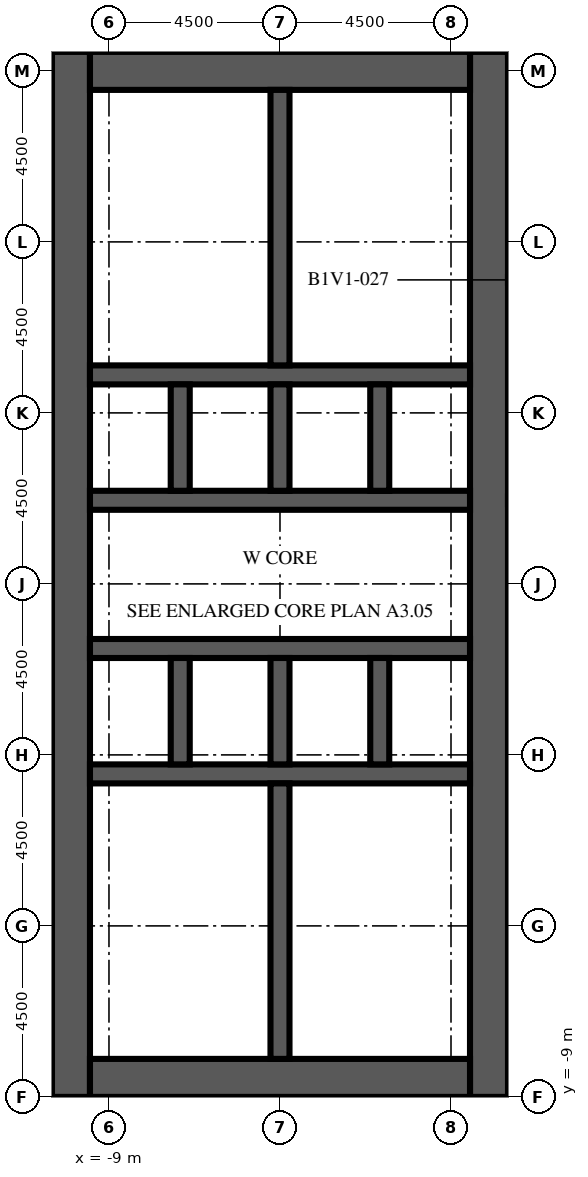
"""IFC4 building model, lengths in metres.
Left out: names, types, materials, properties, quantities, classifications, styles, units other than length and angle.
Written with IfcOpenShell. Run it as: python <this file> out.ifc"""

import sys

from ifc_helpers import new_model, si_unit, direction, frame, frame_2d, origin, place, context, subcontext, project, spatial, rectangle, extrude, element, fill, save


model = new_model("IFC4")
c1 = context("Model", 3, precision=1e-05, world=origin(), true_north=direction((0.0, 1.0)))
c2 = subcontext(c1, "Body", "Model", "MODEL_VIEW")
j1 = project(units=[si_unit("LENGTHUNIT", "METRE"), si_unit("PLANEANGLEUNIT", "RADIAN")], contexts=[c1])
p1 = place(None, origin())
s1 = spatial("IfcSite", under=j1, at=p1, CompositionType="ELEMENT")
p2 = place(p1, origin())
s2 = spatial("IfcBuilding", under=s1, at=p2, CompositionType="ELEMENT")
p3 = place(p2, frame((0.0, 0.0, 19.5)))
s3 = spatial("IfcBuildingStorey", under=s2, at=p3, CompositionType="ELEMENT", Elevation=19.5)
p4 = place(p3, frame((-10.0, -9.0, 0.0), z_axis=(0.0, 0.0, 1.0), x_axis=(0.0, 1.0, 0.0)))
e1 = element("IfcWall", 1, at=p4, inside=s3, PredefinedType="SHEAR", context=c2, shape_type="SweptSolid", body=[
    extrude(rectangle(XDim=27.5, YDim=1.0, at=frame_2d((13.75, 0.0))), origin(), (0.0, 0.0, 1.0), 4.1),
])
p5 = place(p4, frame((12.55, 0.0, 0.0)))
e2 = element("IfcOpeningElement", 2, at=p5, cuts=e1, PredefinedType="OPENING", context=c2, shape_type="SweptSolid", body=[
    extrude(rectangle(XDim=2.4, YDim=2.4, at=frame_2d((1.2, 1.2))), frame((0.0, 0.51, 0.0), z_axis=(0.0, -1.0, 0.0), x_axis=(1.0, 0.0, 0.0)), (0.0, 0.0, 1.0), 1.02),
])
p6 = place(p4, frame((6.825, 0.0, 0.0)))
e3 = element("IfcOpeningElement", 3, at=p6, cuts=e1, PredefinedType="OPENING", context=c2, shape_type="SweptSolid", body=[
    extrude(rectangle(XDim=1.2, YDim=2.1, at=frame_2d((0.6, 1.05))), frame((0.0, 0.51, 0.0), z_axis=(0.0, -1.0, 0.0), x_axis=(1.0, 0.0, 0.0)), (0.0, 0.0, 1.0), 1.02),
])
p7 = place(p4, frame((19.475, 0.0, 0.0)))
e4 = element("IfcOpeningElement", 4, at=p7, cuts=e1, PredefinedType="OPENING", context=c2, shape_type="SweptSolid", body=[
    extrude(rectangle(XDim=1.2, YDim=2.1, at=frame_2d((0.6, 1.05))), frame((0.0, 0.51, 0.0), z_axis=(0.0, -1.0, 0.0), x_axis=(1.0, 0.0, 0.0)), (0.0, 0.0, 1.0), 1.02),
])
p8 = place(p3, frame((1.0, -9.0, 0.0), z_axis=(0.0, 0.0, 1.0), x_axis=(0.0, 1.0, 0.0)))
e5 = element("IfcWall", 5, at=p8, inside=s3, PredefinedType="SHEAR", context=c2, shape_type="SweptSolid", body=[
    extrude(rectangle(XDim=27.5, YDim=1.0, at=frame_2d((13.75, 0.0))), origin(), (0.0, 0.0, 1.0), 4.1),
])
p9 = place(p8, frame((12.55, 0.0, 0.0)))
e6 = element("IfcOpeningElement", 6, at=p9, cuts=e5, PredefinedType="OPENING", context=c2, shape_type="SweptSolid", body=[
    extrude(rectangle(XDim=2.4, YDim=2.4, at=frame_2d((1.2, 1.2))), frame((0.0, 0.51, 0.0), z_axis=(0.0, -1.0, 0.0), x_axis=(1.0, 0.0, 0.0)), (0.0, 0.0, 1.0), 1.02),
])
p10 = place(p8, frame((3.955, 0.0, 0.0)))
e7 = element("IfcOpeningElement", 7, at=p10, cuts=e5, PredefinedType="OPENING", context=c2, shape_type="SweptSolid", body=[
    extrude(rectangle(XDim=0.905, YDim=2.1, at=frame_2d((0.453, 1.05))), frame((0.0, 0.51, 0.0), z_axis=(0.0, -1.0, 0.0), x_axis=(1.0, 0.0, 0.0)), (0.0, 0.0, 1.0), 1.02),
])
p11 = place(p8, frame((23.363, 0.0, 0.0)))
e8 = element("IfcOpeningElement", 8, at=p11, cuts=e5, PredefinedType="OPENING", context=c2, shape_type="SweptSolid", body=[
    extrude(rectangle(XDim=1.2, YDim=2.1, at=frame_2d((0.6, 1.05))), frame((0.0, 0.51, 0.0), z_axis=(0.0, -1.0, 0.0), x_axis=(1.0, 0.0, 0.0)), (0.0, 0.0, 1.0), 1.02),
])
for number, where, z_axis, x_axis in (
    (9, (-9.5, -8.5, 0.0), (0.0, 0.0, 1.0), (1.0, 0.0, 0.0)),
    (10, (-9.5, 18.0, 0.0), (0.0, 0.0, 1.0), (1.0, 0.0, 0.0)),
):
    element("IfcWall", number, at=place(p3, frame(where, z_axis=z_axis, x_axis=x_axis)), inside=s3, PredefinedType="SHEAR", context=c2, shape_type="SweptSolid", body=[
        extrude(rectangle(XDim=10.0, YDim=1.0, at=frame_2d((5.0, 0.0))), origin(), (0.0, 0.0, 1.0), 4.1),
    ])
p12 = place(p3, frame((-9.5, -0.5, 0.0), z_axis=(0.0, 0.0, 1.0), x_axis=(1.0, 0.0, 0.0)))
e11 = element("IfcWall", 11, at=p12, inside=s3, PredefinedType="SHEAR", context=c2, shape_type="SweptSolid", body=[
    extrude(rectangle(XDim=10.0, YDim=0.5, at=frame_2d((5.0, 0.0))), origin(), (0.0, 0.0, 1.0), 4.1),
])
p13 = place(p3, frame((-9.5, 2.8, 0.0), z_axis=(0.0, 0.0, 1.0), x_axis=(1.0, 0.0, 0.0)))
e12 = element("IfcWall", 12, at=p13, inside=s3, PredefinedType="SHEAR", context=c2, shape_type="SweptSolid", body=[
    extrude(rectangle(XDim=10.0, YDim=0.5, at=frame_2d((5.0, 0.0))), origin(), (0.0, 0.0, 1.0), 4.1),
])
p14 = place(p13, frame((0.512, 0.0, 0.0)))
e13 = element("IfcOpeningElement", 13, at=p14, cuts=e12, PredefinedType="OPENING", context=c2, shape_type="SweptSolid", body=[
    extrude(rectangle(XDim=1.1, YDim=2.1, at=frame_2d((0.55, 1.05))), frame((0.0, 0.26, 0.0), z_axis=(0.0, -1.0, 0.0), x_axis=(1.0, 0.0, 0.0)), (0.0, 0.0, 1.0), 0.52),
])
p15 = place(p13, frame((3.137, 0.0, 0.0)))
e14 = element("IfcOpeningElement", 14, at=p15, cuts=e12, PredefinedType="OPENING", context=c2, shape_type="SweptSolid", body=[
    extrude(rectangle(XDim=1.1, YDim=2.1, at=frame_2d((0.55, 1.05))), frame((0.0, 0.26, 0.0), z_axis=(0.0, -1.0, 0.0), x_axis=(1.0, 0.0, 0.0)), (0.0, 0.0, 1.0), 0.52),
])
p16 = place(p13, frame((8.387, 0.0, 0.0)))
e15 = element("IfcOpeningElement", 15, at=p16, cuts=e12, PredefinedType="OPENING", context=c2, shape_type="SweptSolid", body=[
    extrude(rectangle(XDim=1.1, YDim=2.1, at=frame_2d((0.55, 1.05))), frame((0.0, 0.26, 0.0), z_axis=(0.0, -1.0, 0.0), x_axis=(1.0, 0.0, 0.0)), (0.0, 0.0, 1.0), 0.52),
])
p17 = place(p3, frame((-9.5, 6.7, 0.0), z_axis=(0.0, 0.0, 1.0), x_axis=(1.0, 0.0, 0.0)))
e16 = element("IfcWall", 16, at=p17, inside=s3, PredefinedType="SHEAR", context=c2, shape_type="SweptSolid", body=[
    extrude(rectangle(XDim=10.0, YDim=0.5, at=frame_2d((5.0, 0.0))), origin(), (0.0, 0.0, 1.0), 4.1),
])
p18 = place(p17, frame((0.512, 0.0, 0.0)))
e17 = element("IfcOpeningElement", 17, at=p18, cuts=e16, PredefinedType="OPENING", context=c2, shape_type="SweptSolid", body=[
    extrude(rectangle(XDim=1.1, YDim=2.1, at=frame_2d((0.55, 1.05))), frame((0.0, 0.26, 0.0), z_axis=(0.0, -1.0, 0.0), x_axis=(1.0, 0.0, 0.0)), (0.0, 0.0, 1.0), 0.52),
])
p19 = place(p17, frame((3.188, 0.0, 0.0)))
e18 = element("IfcOpeningElement", 18, at=p19, cuts=e16, PredefinedType="OPENING", context=c2, shape_type="SweptSolid", body=[
    extrude(rectangle(XDim=1.0, YDim=2.1, at=frame_2d((0.5, 1.05))), frame((0.0, 0.26, 0.0), z_axis=(0.0, -1.0, 0.0), x_axis=(1.0, 0.0, 0.0)), (0.0, 0.0, 1.0), 0.52),
])
p20 = place(p17, frame((5.812, 0.0, 0.0)))
e19 = element("IfcOpeningElement", 19, at=p20, cuts=e16, PredefinedType="OPENING", context=c2, shape_type="SweptSolid", body=[
    extrude(rectangle(XDim=1.0, YDim=2.1, at=frame_2d((0.5, 1.05))), frame((0.0, 0.26, 0.0), z_axis=(0.0, -1.0, 0.0), x_axis=(1.0, 0.0, 0.0)), (0.0, 0.0, 1.0), 0.52),
])
p21 = place(p17, frame((8.438, 0.0, 0.0)))
e20 = element("IfcOpeningElement", 20, at=p21, cuts=e16, PredefinedType="OPENING", context=c2, shape_type="SweptSolid", body=[
    extrude(rectangle(XDim=1.0, YDim=2.1, at=frame_2d((0.5, 1.05))), frame((0.0, 0.26, 0.0), z_axis=(0.0, -1.0, 0.0), x_axis=(1.0, 0.0, 0.0)), (0.0, 0.0, 1.0), 0.52),
])
p22 = place(p3, frame((-9.5, 10.0, 0.0), z_axis=(0.0, 0.0, 1.0), x_axis=(1.0, 0.0, 0.0)))
e21 = element("IfcWall", 21, at=p22, inside=s3, PredefinedType="SHEAR", context=c2, shape_type="SweptSolid", body=[
    extrude(rectangle(XDim=10.0, YDim=0.5, at=frame_2d((5.0, 0.0))), origin(), (0.0, 0.0, 1.0), 4.1),
])
for number, where, z_axis, x_axis in (
    (22, (-7.125, -0.25, 0.0), (0.0, 0.0, 1.0), (0.0, 1.0, 0.0)),
    (23, (-7.125, 6.95, 0.0), (0.0, 0.0, 1.0), (0.0, 1.0, 0.0)),
    (24, (-4.5, -0.25, 0.0), (0.0, 0.0, 1.0), (0.0, 1.0, 0.0)),
    (25, (-4.5, 6.95, 0.0), (0.0, 0.0, 1.0), (0.0, 1.0, 0.0)),
    (26, (-1.875, -0.25, 0.0), (0.0, 0.0, 1.0), (0.0, 1.0, 0.0)),
    (27, (-1.875, 6.95, 0.0), (0.0, 0.0, 1.0), (0.0, 1.0, 0.0)),
):
    element("IfcWall", number, at=place(p3, frame(where, z_axis=z_axis, x_axis=x_axis)), inside=s3, PredefinedType="SHEAR", context=c2, shape_type="SweptSolid", body=[
        extrude(rectangle(XDim=2.8, YDim=0.5, at=frame_2d((1.4, 0.0))), origin(), (0.0, 0.0, 1.0), 4.1),
    ])
for number, where, z_axis, x_axis in (
    (28, (-4.5, -8.0, 0.0), (0.0, 0.0, 1.0), (0.0, 1.0, 0.0)),
    (29, (-4.5, 10.25, 0.0), (0.0, 0.0, 1.0), (0.0, 1.0, 0.0)),
):
    element("IfcWall", number, at=place(p3, frame(where, z_axis=z_axis, x_axis=x_axis)), inside=s3, PredefinedType="SHEAR", context=c2, shape_type="SweptSolid", body=[
        extrude(rectangle(XDim=7.25, YDim=0.5, at=frame_2d((3.625, 0.0))), origin(), (0.0, 0.0, 1.0), 4.1),
    ])
p23 = place(p3, frame((-4.25, -5.245, 0.0), z_axis=(0.0, 0.0, 1.0), x_axis=(1.0, 0.0, 0.0)))
e30 = element("IfcWall", 30, at=p23, inside=s3, PredefinedType="PARTITIONING", context=c2, shape_type="SweptSolid", body=[
    extrude(rectangle(XDim=4.75, YDim=0.1, at=frame_2d((2.375, 0.0))), origin(), (0.0, 0.0, 1.0), 3.65),
])
p24 = place(p23, frame((1.875, 0.0, 0.0)))
e31 = element("IfcOpeningElement", 31, at=p24, cuts=e30, PredefinedType="OPENING", context=c2, shape_type="SweptSolid", body=[
    extrude(rectangle(XDim=1.0, YDim=2.1, at=frame_2d((0.5, 1.05))), frame((0.0, 0.06, 0.0), z_axis=(0.0, -1.0, 0.0), x_axis=(1.0, 0.0, 0.0)), (0.0, 0.0, 1.0), 0.12),
])
p25 = place(p3, frame((-2.445, -3.94, 0.0), z_axis=(0.0, 0.0, 1.0), x_axis=(1.0, 0.0, 0.0)))
e32 = element("IfcWall", 32, at=p25, inside=s3, PredefinedType="PARTITIONING", context=c2, shape_type="SweptSolid", body=[
    extrude(rectangle(XDim=2.945, YDim=0.1, at=frame_2d((1.473, 0.0))), origin(), (0.0, 0.0, 1.0), 3.65),
])
p26 = place(p25, frame((0.972, 0.0, 0.0)))
e33 = element("IfcOpeningElement", 33, at=p26, cuts=e32, PredefinedType="OPENING", context=c2, shape_type="SweptSolid", body=[
    extrude(rectangle(XDim=1.0, YDim=2.1, at=frame_2d((0.5, 1.05))), frame((0.0, 0.06, 0.0), z_axis=(0.0, -1.0, 0.0), x_axis=(1.0, 0.0, 0.0)), (0.0, 0.0, 1.0), 0.12),
])
p27 = place(p3, frame((-4.25, -3.94, 0.0), z_axis=(0.0, 0.0, 1.0), x_axis=(1.0, 0.0, 0.0)))
e34 = element("IfcWall", 34, at=p27, inside=s3, PredefinedType="PARTITIONING", context=c2, shape_type="SweptSolid", body=[
    extrude(rectangle(XDim=1.805, YDim=0.1, at=frame_2d((0.902, 0.0))), origin(), (0.0, 0.0, 1.0), 3.65),
])
p28 = place(p27, frame((0.403, 0.0, 0.0)))
e35 = element("IfcOpeningElement", 35, at=p28, cuts=e34, PredefinedType="OPENING", context=c2, shape_type="SweptSolid", body=[
    extrude(rectangle(XDim=1.0, YDim=2.1, at=frame_2d((0.5, 1.05))), frame((0.0, 0.06, 0.0), z_axis=(0.0, -1.0, 0.0), x_axis=(1.0, 0.0, 0.0)), (0.0, 0.0, 1.0), 0.12),
])
p29 = place(p3, frame((-2.445, -3.94, 0.0), z_axis=(0.0, 0.0, 1.0), x_axis=(0.0, 1.0, 0.0)))
e36 = element("IfcWall", 36, at=p29, inside=s3, PredefinedType="PARTITIONING", context=c2, shape_type="SweptSolid", body=[
    extrude(rectangle(XDim=3.19, YDim=0.1, at=frame_2d((1.595, 0.0))), origin(), (0.0, 0.0, 1.0), 3.65),
])
p30 = place(p3, frame((-0.8, 12.425, 0.0), z_axis=(0.0, 0.0, 1.0), x_axis=(1.0, 0.0, 0.0)))
e37 = element("IfcWall", 37, at=p30, inside=s3, PredefinedType="PARTITIONING", context=c2, shape_type="SweptSolid", body=[
    extrude(rectangle(XDim=1.3, YDim=0.1, at=frame_2d((0.65, 0.0))), origin(), (0.0, 0.0, 1.0), 3.65),
])
p31 = place(p30, frame((0.2, 0.0, 0.0)))
e38 = element("IfcOpeningElement", 38, at=p31, cuts=e37, PredefinedType="OPENING", context=c2, shape_type="SweptSolid", body=[
    extrude(rectangle(XDim=0.9, YDim=2.1, at=frame_2d((0.45, 1.05))), frame((0.0, 0.06, 0.0), z_axis=(0.0, -1.0, 0.0), x_axis=(1.0, 0.0, 0.0)), (0.0, 0.0, 1.0), 0.12),
])
p32 = place(p3, frame((-4.25, 12.425, 0.0), z_axis=(0.0, 0.0, 1.0), x_axis=(1.0, 0.0, 0.0)))
e39 = element("IfcWall", 39, at=p32, inside=s3, PredefinedType="PARTITIONING", context=c2, shape_type="SweptSolid", body=[
    extrude(rectangle(XDim=3.45, YDim=0.1, at=frame_2d((1.725, 0.0))), origin(), (0.0, 0.0, 1.0), 3.65),
])
p33 = place(p3, frame((-0.8, 12.425, 0.0), z_axis=(0.0, 0.0, 1.0), x_axis=(0.0, 1.0, 0.0)))
e40 = element("IfcWall", 40, at=p33, inside=s3, PredefinedType="PARTITIONING", context=c2, shape_type="SweptSolid", body=[
    extrude(rectangle(XDim=2.537, YDim=0.1, at=frame_2d((1.269, 0.0))), origin(), (0.0, 0.0, 1.0), 3.65),
])
p34 = place(p33, frame((0.769, 0.0, 0.0)))
e41 = element("IfcOpeningElement", 41, at=p34, cuts=e40, PredefinedType="OPENING", context=c2, shape_type="SweptSolid", body=[
    extrude(rectangle(XDim=1.0, YDim=2.1, at=frame_2d((0.5, 1.05))), frame((0.0, 0.06, 0.0), z_axis=(0.0, -1.0, 0.0), x_axis=(1.0, 0.0, 0.0)), (0.0, 0.0, 1.0), 0.12),
])
p35 = place(p3, frame((-0.8, 14.962, 0.0), z_axis=(0.0, 0.0, 1.0), x_axis=(0.0, 1.0, 0.0)))
e42 = element("IfcWall", 42, at=p35, inside=s3, PredefinedType="PARTITIONING", context=c2, shape_type="SweptSolid", body=[
    extrude(rectangle(XDim=2.538, YDim=0.1, at=frame_2d((1.269, 0.0))), origin(), (0.0, 0.0, 1.0), 3.65),
])
p36 = place(p35, frame((0.769, 0.0, 0.0)))
e43 = element("IfcOpeningElement", 43, at=p36, cuts=e42, PredefinedType="OPENING", context=c2, shape_type="SweptSolid", body=[
    extrude(rectangle(XDim=1.0, YDim=2.1, at=frame_2d((0.5, 1.05))), frame((0.0, 0.06, 0.0), z_axis=(0.0, -1.0, 0.0), x_axis=(1.0, 0.0, 0.0)), (0.0, 0.0, 1.0), 0.12),
])
p37 = place(p3, frame((-4.25, 14.962, 0.0), z_axis=(0.0, 0.0, 1.0), x_axis=(1.0, 0.0, 0.0)))
e44 = element("IfcWall", 44, at=p37, inside=s3, PredefinedType="PARTITIONING", context=c2, shape_type="SweptSolid", body=[
    extrude(rectangle(XDim=3.45, YDim=0.1, at=frame_2d((1.725, 0.0))), origin(), (0.0, 0.0, 1.0), 3.65),
])
p38 = place(p14, origin())
e45 = element("IfcDoor", 45, at=p38, inside=s3, OperationType="DOUBLE_DOOR_SLIDING", PredefinedType="DOOR", context=c2, shape_type="SweptSolid", body=[
    extrude(rectangle(XDim=1.1, YDim=2.1, at=frame_2d((0.55, 1.05))), frame((0.0, 0.025, 0.0), z_axis=(0.0, -1.0, 0.0), x_axis=(1.0, 0.0, 0.0)), (0.0, 0.0, 1.0), 0.05),
])
fill(e13, e45)
p39 = place(p15, origin())
e46 = element("IfcDoor", 46, at=p39, inside=s3, OperationType="DOUBLE_DOOR_SLIDING", PredefinedType="DOOR", context=c2, shape_type="SweptSolid", body=[
    extrude(rectangle(XDim=1.1, YDim=2.1, at=frame_2d((0.55, 1.05))), frame((0.0, 0.025, 0.0), z_axis=(0.0, -1.0, 0.0), x_axis=(1.0, 0.0, 0.0)), (0.0, 0.0, 1.0), 0.05),
])
fill(e14, e46)
p40 = place(p16, origin())
e47 = element("IfcDoor", 47, at=p40, inside=s3, OperationType="DOUBLE_DOOR_SLIDING", PredefinedType="DOOR", context=c2, shape_type="SweptSolid", body=[
    extrude(rectangle(XDim=1.1, YDim=2.1, at=frame_2d((0.55, 1.05))), frame((0.0, 0.025, 0.0), z_axis=(0.0, -1.0, 0.0), x_axis=(1.0, 0.0, 0.0)), (0.0, 0.0, 1.0), 0.05),
])
fill(e15, e47)
p41 = place(p18, origin())
e48 = element("IfcDoor", 48, at=p41, inside=s3, OperationType="DOUBLE_DOOR_SLIDING", PredefinedType="DOOR", context=c2, shape_type="SweptSolid", body=[
    extrude(rectangle(XDim=1.1, YDim=2.1, at=frame_2d((0.55, 1.05))), frame((0.0, 0.025, 0.0), z_axis=(0.0, -1.0, 0.0), x_axis=(1.0, 0.0, 0.0)), (0.0, 0.0, 1.0), 0.05),
])
fill(e17, e48)
p42 = place(p5, origin())
e49 = element("IfcDoor", 49, at=p42, inside=s3, OperationType="DOUBLE_DOOR_DOUBLE_SWING", PredefinedType="DOOR", context=c2, shape_type="SweptSolid", body=[
    extrude(rectangle(XDim=2.4, YDim=2.4, at=frame_2d((1.2, 1.2))), frame((0.0, 0.025, 0.0), z_axis=(0.0, -1.0, 0.0), x_axis=(1.0, 0.0, 0.0)), (0.0, 0.0, 1.0), 0.05),
])
fill(e2, e49)
p43 = place(p9, origin())
e50 = element("IfcDoor", 50, at=p43, inside=s3, OperationType="DOUBLE_DOOR_DOUBLE_SWING", PredefinedType="DOOR", context=c2, shape_type="SweptSolid", body=[
    extrude(rectangle(XDim=2.4, YDim=2.4, at=frame_2d((1.2, 1.2))), frame((0.0, 0.025, 0.0), z_axis=(0.0, -1.0, 0.0), x_axis=(1.0, 0.0, 0.0)), (0.0, 0.0, 1.0), 0.05),
])
fill(e6, e50)
p44 = place(p6, origin())
e51 = element("IfcDoor", 51, at=p44, inside=s3, OperationType="SINGLE_SWING_LEFT", PredefinedType="DOOR", context=c2, shape_type="SweptSolid", body=[
    extrude(rectangle(XDim=1.2, YDim=2.1, at=frame_2d((0.6, 1.05))), frame((0.0, 0.025, 0.0), z_axis=(0.0, -1.0, 0.0), x_axis=(1.0, 0.0, 0.0)), (0.0, 0.0, 1.0), 0.05),
])
fill(e3, e51)
p45 = place(p7, origin())
e52 = element("IfcDoor", 52, at=p45, inside=s3, OperationType="SINGLE_SWING_LEFT", PredefinedType="DOOR", context=c2, shape_type="SweptSolid", body=[
    extrude(rectangle(XDim=1.2, YDim=2.1, at=frame_2d((0.6, 1.05))), frame((0.0, 0.025, 0.0), z_axis=(0.0, -1.0, 0.0), x_axis=(1.0, 0.0, 0.0)), (0.0, 0.0, 1.0), 0.05),
])
fill(e4, e52)
p46 = place(p19, origin())
e53 = element("IfcDoor", 53, at=p46, inside=s3, OperationType="SINGLE_SWING_RIGHT", PredefinedType="DOOR", context=c2, shape_type="SweptSolid", body=[
    extrude(rectangle(XDim=1.0, YDim=2.1, at=frame_2d((0.5, 1.05))), frame((0.0, 0.025, 0.0), z_axis=(0.0, -1.0, 0.0), x_axis=(1.0, 0.0, 0.0)), (0.0, 0.0, 1.0), 0.05),
])
fill(e18, e53)
p47 = place(p20, origin())
e54 = element("IfcDoor", 54, at=p47, inside=s3, OperationType="SINGLE_SWING_LEFT", PredefinedType="DOOR", context=c2, shape_type="SweptSolid", body=[
    extrude(rectangle(XDim=1.0, YDim=2.1, at=frame_2d((0.5, 1.05))), frame((0.0, 0.025, 0.0), z_axis=(0.0, -1.0, 0.0), x_axis=(1.0, 0.0, 0.0)), (0.0, 0.0, 1.0), 0.05),
])
fill(e19, e54)
p48 = place(p21, origin())
e55 = element("IfcDoor", 55, at=p48, inside=s3, OperationType="SINGLE_SWING_RIGHT", PredefinedType="DOOR", context=c2, shape_type="SweptSolid", body=[
    extrude(rectangle(XDim=1.0, YDim=2.1, at=frame_2d((0.5, 1.05))), frame((0.0, 0.025, 0.0), z_axis=(0.0, -1.0, 0.0), x_axis=(1.0, 0.0, 0.0)), (0.0, 0.0, 1.0), 0.05),
])
fill(e20, e55)
p49 = place(p10, origin())
e56 = element("IfcDoor", 56, at=p49, inside=s3, OperationType="SINGLE_SWING_LEFT", PredefinedType="DOOR", context=c2, shape_type="SweptSolid", body=[
    extrude(rectangle(XDim=0.905, YDim=2.1, at=frame_2d((0.453, 1.05))), frame((0.0, 0.475, 0.0), z_axis=(0.0, -1.0, 0.0), x_axis=(1.0, 0.0, 0.0)), (0.0, 0.0, 1.0), 0.05),
])
fill(e7, e56)
p50 = place(p24, origin())
e57 = element("IfcDoor", 57, at=p50, inside=s3, OperationType="SINGLE_SWING_RIGHT", PredefinedType="DOOR", context=c2, shape_type="SweptSolid", body=[
    extrude(rectangle(XDim=1.0, YDim=2.1, at=frame_2d((0.5, 1.05))), frame((0.0, 0.025, 0.0), z_axis=(0.0, -1.0, 0.0), x_axis=(1.0, 0.0, 0.0)), (0.0, 0.0, 1.0), 0.05),
])
fill(e31, e57)
p51 = place(p26, origin())
e58 = element("IfcDoor", 58, at=p51, inside=s3, OperationType="SINGLE_SWING_LEFT", PredefinedType="DOOR", context=c2, shape_type="SweptSolid", body=[
    extrude(rectangle(XDim=1.0, YDim=2.1, at=frame_2d((0.5, 1.05))), frame((0.0, 0.025, 0.0), z_axis=(0.0, -1.0, 0.0), x_axis=(1.0, 0.0, 0.0)), (0.0, 0.0, 1.0), 0.05),
])
fill(e33, e58)
p52 = place(p28, origin())
e59 = element("IfcDoor", 59, at=p52, inside=s3, OperationType="SINGLE_SWING_RIGHT", PredefinedType="DOOR", context=c2, shape_type="SweptSolid", body=[
    extrude(rectangle(XDim=1.0, YDim=2.1, at=frame_2d((0.5, 1.05))), frame((0.0, 0.025, 0.0), z_axis=(0.0, -1.0, 0.0), x_axis=(1.0, 0.0, 0.0)), (0.0, 0.0, 1.0), 0.05),
])
fill(e35, e59)
p53 = place(p31, origin())
e60 = element("IfcDoor", 60, at=p53, inside=s3, OperationType="SINGLE_SWING_LEFT", PredefinedType="DOOR", context=c2, shape_type="SweptSolid", body=[
    extrude(rectangle(XDim=0.9, YDim=2.1, at=frame_2d((0.45, 1.05))), frame((0.0, 0.025, 0.0), z_axis=(0.0, -1.0, 0.0), x_axis=(1.0, 0.0, 0.0)), (0.0, 0.0, 1.0), 0.05),
])
fill(e38, e60)
p54 = place(p11, origin())
e61 = element("IfcDoor", 61, at=p54, inside=s3, OperationType="SINGLE_SWING_RIGHT", PredefinedType="DOOR", context=c2, shape_type="SweptSolid", body=[
    extrude(rectangle(XDim=1.2, YDim=2.1, at=frame_2d((0.6, 1.05))), frame((0.0, 0.475, 0.0), z_axis=(0.0, -1.0, 0.0), x_axis=(1.0, 0.0, 0.0)), (0.0, 0.0, 1.0), 0.05),
])
fill(e8, e61)
p55 = place(p34, origin())
e62 = element("IfcDoor", 62, at=p55, inside=s3, OperationType="SINGLE_SWING_LEFT", PredefinedType="DOOR", context=c2, shape_type="SweptSolid", body=[
    extrude(rectangle(XDim=1.0, YDim=2.1, at=frame_2d((0.5, 1.05))), frame((0.0, 0.025, 0.0), z_axis=(0.0, -1.0, 0.0), x_axis=(1.0, 0.0, 0.0)), (0.0, 0.0, 1.0), 0.05),
])
fill(e41, e62)
p56 = place(p36, origin())
e63 = element("IfcDoor", 63, at=p56, inside=s3, OperationType="SINGLE_SWING_RIGHT", PredefinedType="DOOR", context=c2, shape_type="SweptSolid", body=[
    extrude(rectangle(XDim=1.0, YDim=2.1, at=frame_2d((0.5, 1.05))), frame((0.0, 0.025, 0.0), z_axis=(0.0, -1.0, 0.0), x_axis=(1.0, 0.0, 0.0)), (0.0, 0.0, 1.0), 0.05),
])
fill(e43, e63)
save(model, sys.argv[1])
